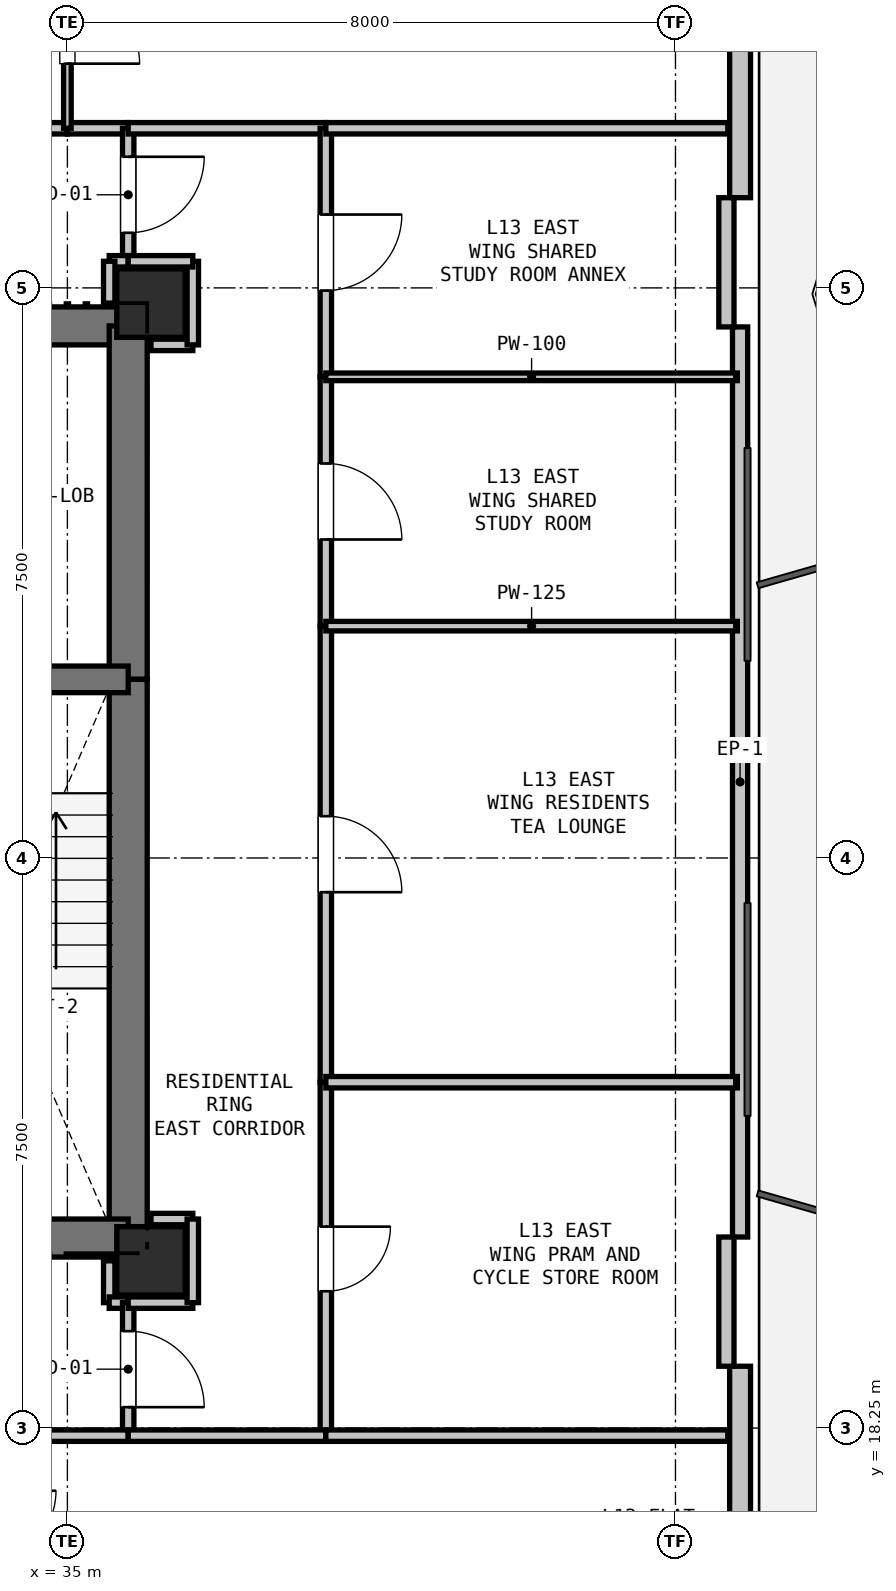
"""IFC4 building model, lengths in metres.
Left out: names, types, materials, properties, quantities, classifications, styles, units other than length and angle.
Written with IfcOpenShell. Run it as: python <this file> out.ifc"""

import sys

from ifc_helpers import new_model, si_unit, direction, frame, frame_2d, origin, origin_2d, place, context, subcontext, project, spatial, rectangle, extrude, element, fill, save


model = new_model("IFC4")
c1 = context("Model", 3, precision=1e-05, world=origin(), true_north=direction((0.0, 1.0)))
c2 = subcontext(c1, "Body", "Model", "MODEL_VIEW")
j1 = project(units=[si_unit("LENGTHUNIT", "METRE"), si_unit("PLANEANGLEUNIT", "RADIAN")], contexts=[c1])
p1 = place(None, origin())
s1 = spatial("IfcSite", under=j1, at=p1, CompositionType="ELEMENT")
p2 = place(p1, origin())
s2 = spatial("IfcBuilding", under=s1, at=p2, CompositionType="ELEMENT")
p3 = place(p2, frame((0.0, 0.0, 48.9)))
s3 = spatial("IfcBuildingStorey", under=s2, at=p3, CompositionType="ELEMENT", Elevation=48.9)
for number, where, z_axis, x_axis in (
    (1, (36.1, 33.05, 0.0), (0.0, 0.0, 1.0), (1.0, 0.0, 0.0)),
    (2, (36.1, 20.45, 0.0), (0.0, 0.0, 1.0), (1.0, 0.0, 0.0)),
):
    element("IfcColumn", number, at=place(p3, frame(where, z_axis=z_axis, x_axis=x_axis)), inside=s3, PredefinedType="COLUMN", context=c2, shape_type="SweptSolid", body=[
        extrude(rectangle(XDim=0.9, YDim=0.9, at=origin_2d()), origin(), (0.0, 0.0, 1.0), 3.3),
    ])
p4 = place(p3, frame((43.85, 47.11, 0.0), z_axis=(0.0, 0.0, 1.0), x_axis=(0.0, -1.0, 0.0)))
e3 = element("IfcWall", 3, at=p4, inside=s3, PredefinedType="SOLIDWALL", context=c2, shape_type="SweptSolid", body=[
    extrude(rectangle(XDim=12.673, YDim=0.275, at=frame_2d((6.336, 0.0))), origin(), (0.0, 0.0, 1.0), 2.66),
])
p5 = place(p4, frame((2.325, 0.0, 0.0)))
e4 = element("IfcOpeningElement", 4, at=p5, cuts=e3, PredefinedType="OPENING", context=c2, shape_type="SweptSolid", body=[
    extrude(rectangle(XDim=1.1, YDim=2.1, at=frame_2d((0.55, 1.05))), frame((0.0, 0.147, 0.0), z_axis=(0.0, -1.0, 0.0), x_axis=(1.0, 0.0, 0.0)), (0.0, 0.0, 1.0), 0.295),
])
p6 = place(p3, frame((43.85, 32.737, 0.0), z_axis=(0.0, 0.0, 1.0), x_axis=(0.0, -1.0, 0.0)))
e5 = element("IfcWall", 5, at=p6, inside=s3, PredefinedType="PARAPET", context=c2, shape_type="SweptSolid", body=[
    extrude(rectangle(XDim=11.973, YDim=0.2, at=frame_2d((5.987, 0.0))), origin(), (0.0, 0.0, 1.0), 0.2),
])
p7 = place(p3, frame((43.85, 19.063, 0.0), z_axis=(0.0, 0.0, 1.0), x_axis=(0.0, -1.0, 0.0)))
e6 = element("IfcWall", 6, at=p7, inside=s3, PredefinedType="SOLIDWALL", context=c2, shape_type="SweptSolid", body=[
    extrude(rectangle(XDim=12.673, YDim=0.275, at=frame_2d((6.336, 0.0))), origin(), (0.0, 0.0, 1.0), 2.66),
])
for number, where, z_axis, x_axis in (
    (7, (43.67, 34.437, 0.0), (0.0, 0.0, 1.0), (0.0, -1.0, 0.0)),
    (8, (43.67, 20.763, 0.0), (0.0, 0.0, 1.0), (0.0, -1.0, 0.0)),
):
    element("IfcWall", number, at=place(p3, frame(where, z_axis=z_axis, x_axis=x_axis)), inside=s3, PredefinedType="PARAPET", context=c2, shape_type="SweptSolid", body=[
        extrude(rectangle(XDim=1.7, YDim=0.2, at=frame_2d((0.85, 0.0))), origin(), (0.0, 0.0, 1.0), 2.66),
    ])
p8 = place(p3, frame((32.35, 32.75, 0.0), z_axis=(0.0, 0.0, 1.0), x_axis=(1.0, 0.0, 0.0)))
e9 = element("IfcWall", 9, at=p8, inside=s3, PredefinedType="SHEAR", context=c2, shape_type="SweptSolid", body=[
    extrude(rectangle(XDim=3.45, YDim=0.5, at=frame_2d((1.725, 0.0))), origin(), (0.0, 0.0, 1.0), 3.04),
])
p9 = place(p8, frame((0.65, 0.0, 0.0)))
e10 = element("IfcOpeningElement", 10, at=p9, cuts=e9, PredefinedType="OPENING", context=c2, shape_type="SweptSolid", body=[
    extrude(rectangle(XDim=1.15, YDim=2.15, at=frame_2d((0.575, 1.075))), frame((0.0, 0.26, 0.0), z_axis=(0.0, -1.0, 0.0), x_axis=(1.0, 0.0, 0.0)), (0.0, 0.0, 1.0), 0.52),
])
p10 = place(p3, frame((35.8, 32.75, 0.0), z_axis=(0.0, 0.0, 1.0), x_axis=(0.0, -1.0, 0.0)))
e11 = element("IfcWall", 11, at=p10, inside=s3, PredefinedType="SHEAR", context=c2, shape_type="SweptSolid", body=[
    extrude(rectangle(XDim=4.65, YDim=0.5, at=frame_2d((2.325, 0.0))), origin(), (0.0, 0.0, 1.0), 3.04),
])
p11 = place(p3, frame((35.8, 28.1, 0.0), z_axis=(0.0, 0.0, 1.0), x_axis=(0.0, -1.0, 0.0)))
e12 = element("IfcWall", 12, at=p11, inside=s3, PredefinedType="SHEAR", context=c2, shape_type="SweptSolid", body=[
    extrude(rectangle(XDim=7.35, YDim=0.5, at=frame_2d((3.675, 0.0))), origin(), (0.0, 0.0, 1.0), 3.04),
])
p12 = place(p3, frame((35.8, 20.75, 0.0), z_axis=(0.0, 0.0, 1.0), x_axis=(-1.0, 0.0, 0.0)))
e13 = element("IfcWall", 13, at=p12, inside=s3, PredefinedType="SHEAR", context=c2, shape_type="SweptSolid", body=[
    extrude(rectangle(XDim=3.45, YDim=0.5, at=frame_2d((1.725, 0.0))), origin(), (0.0, 0.0, 1.0), 3.04),
])
p13 = place(p3, frame((32.35, 28.1, 0.0), z_axis=(0.0, 0.0, 1.0), x_axis=(1.0, 0.0, 0.0)))
e14 = element("IfcWall", 14, at=p13, inside=s3, PredefinedType="SHEAR", context=c2, shape_type="SweptSolid", body=[
    extrude(rectangle(XDim=3.45, YDim=0.35, at=frame_2d((1.725, 0.0))), origin(), (0.0, 0.0, 1.0), 3.04),
])
p14 = place(p13, frame((1.15, 0.0, 0.0)))
e15 = element("IfcOpeningElement", 15, at=p14, cuts=e14, PredefinedType="OPENING", context=c2, shape_type="SweptSolid", body=[
    extrude(rectangle(XDim=1.15, YDim=2.15, at=frame_2d((0.575, 1.075))), frame((0.0, 0.185, 0.0), z_axis=(0.0, -1.0, 0.0), x_axis=(1.0, 0.0, 0.0)), (0.0, 0.0, 1.0), 0.37),
])
p15 = place(p3, frame((35.55, 20.45, 0.0), z_axis=(0.0, 0.0, 1.0), x_axis=(0.0, -1.0, 0.0)))
e16 = element("IfcWall", 16, at=p15, inside=s3, PredefinedType="PARTITIONING", context=c2, shape_type="SweptSolid", body=[
    extrude(rectangle(XDim=0.55, YDim=0.15, at=frame_2d((0.275, 0.0))), origin(), (0.0, 0.0, 1.0), 2.488),
])
p16 = place(p3, frame((35.55, 19.9, 0.0), z_axis=(0.0, 0.0, 1.0), x_axis=(1.0, 0.0, 0.0)))
e17 = element("IfcWall", 17, at=p16, inside=s3, PredefinedType="PARTITIONING", context=c2, shape_type="SweptSolid", body=[
    extrude(rectangle(XDim=0.25, YDim=0.15, at=frame_2d((0.125, 0.0))), origin(), (0.0, 0.0, 1.0), 3.04),
])
p17 = place(p3, frame((35.8, 19.9, 0.0), z_axis=(0.0, 0.0, 1.0), x_axis=(0.0, -1.0, 0.0)))
e18 = element("IfcWall", 18, at=p17, inside=s3, PredefinedType="PARTITIONING", context=c2, shape_type="SweptSolid", body=[
    extrude(rectangle(XDim=1.75, YDim=0.15, at=frame_2d((0.875, 0.0))), origin(), (0.0, 0.0, 1.0), 3.04),
])
p18 = place(p17, frame((0.375, 0.0, 0.0)))
e19 = element("IfcOpeningElement", 19, at=p18, cuts=e18, PredefinedType="OPENING", context=c2, shape_type="SweptSolid", body=[
    extrude(rectangle(XDim=1.0, YDim=2.15, at=frame_2d((0.5, 1.075))), frame((0.0, 0.085, 0.0), z_axis=(0.0, -1.0, 0.0), x_axis=(1.0, 0.0, 0.0)), (0.0, 0.0, 1.0), 0.17),
])
p19 = place(p3, frame((35.8, 18.15, 0.0), z_axis=(0.0, 0.0, 1.0), x_axis=(-1.0, 0.0, 0.0)))
e20 = element("IfcWall", 20, at=p19, inside=s3, PredefinedType="PARTITIONING", context=c2, shape_type="SweptSolid", body=[
    extrude(rectangle(XDim=1.9, YDim=0.15, at=frame_2d((0.95, 0.0))), origin(), (0.0, 0.0, 1.0), 3.04),
])
p20 = place(p3, frame((32.5, 35.35, 0.0), z_axis=(0.0, 0.0, 1.0), x_axis=(1.0, 0.0, 0.0)))
e21 = element("IfcWall", 21, at=p20, inside=s3, PredefinedType="PARTITIONING", context=c2, shape_type="SweptSolid", body=[
    extrude(rectangle(XDim=2.5, YDim=0.15, at=frame_2d((1.25, 0.0))), origin(), (0.0, 0.0, 1.0), 3.04),
])
p21 = place(p20, frame((0.75, 0.0, 0.0)))
e22 = element("IfcOpeningElement", 22, at=p21, cuts=e21, PredefinedType="OPENING", context=c2, shape_type="SweptSolid", body=[
    extrude(rectangle(XDim=1.0, YDim=2.15, at=frame_2d((0.5, 1.075))), frame((0.0, 0.085, 0.0), z_axis=(0.0, -1.0, 0.0), x_axis=(1.0, 0.0, 0.0)), (0.0, 0.0, 1.0), 0.17),
])
p22 = place(p3, frame((35.0, 35.35, 0.0), z_axis=(0.0, 0.0, 1.0), x_axis=(1.0, 0.0, 0.0)))
e23 = element("IfcWall", 23, at=p22, inside=s3, PredefinedType="PARTITIONING", context=c2, shape_type="SweptSolid", body=[
    extrude(rectangle(XDim=0.8, YDim=0.15, at=frame_2d((0.4, 0.0))), origin(), (0.0, 0.0, 1.0), 3.04),
])
p23 = place(p3, frame((35.8, 35.35, 0.0), z_axis=(0.0, 0.0, 1.0), x_axis=(0.0, -1.0, 0.0)))
e24 = element("IfcWall", 24, at=p23, inside=s3, PredefinedType="PARTITIONING", context=c2, shape_type="SweptSolid", body=[
    extrude(rectangle(XDim=1.75, YDim=0.15, at=frame_2d((0.875, 0.0))), origin(), (0.0, 0.0, 1.0), 3.04),
])
p24 = place(p23, frame((0.375, 0.0, 0.0)))
e25 = element("IfcOpeningElement", 25, at=p24, cuts=e24, PredefinedType="OPENING", context=c2, shape_type="SweptSolid", body=[
    extrude(rectangle(XDim=1.0, YDim=2.15, at=frame_2d((0.5, 1.075))), frame((0.0, 0.085, 0.0), z_axis=(0.0, -1.0, 0.0), x_axis=(1.0, 0.0, 0.0)), (0.0, 0.0, 1.0), 0.17),
])
p25 = place(p3, frame((35.8, 33.6, 0.0), z_axis=(0.0, 0.0, 1.0), x_axis=(-1.0, 0.0, 0.0)))
e26 = element("IfcWall", 26, at=p25, inside=s3, PredefinedType="PARTITIONING", context=c2, shape_type="SweptSolid", body=[
    extrude(rectangle(XDim=0.25, YDim=0.15, at=frame_2d((0.125, 0.0))), origin(), (0.0, 0.0, 1.0), 3.04),
])
p26 = place(p3, frame((35.55, 33.6, 0.0), z_axis=(0.0, 0.0, 1.0), x_axis=(0.0, -1.0, 0.0)))
e27 = element("IfcWall", 27, at=p26, inside=s3, PredefinedType="PARTITIONING", context=c2, shape_type="SweptSolid", body=[
    extrude(rectangle(XDim=0.55, YDim=0.15, at=frame_2d((0.275, 0.0))), origin(), (0.0, 0.0, 1.0), 2.488),
])
for number, where, z_axis, x_axis in (
    (28, (36.65, 21.0, 0.0), (0.0, 0.0, 1.0), (-1.0, 0.0, 0.0)),
    (29, (36.1, 32.5, 0.0), (0.0, 0.0, 1.0), (1.0, 0.0, 0.0)),
):
    element("IfcWall", number, at=place(p3, frame(where, z_axis=z_axis, x_axis=x_axis)), inside=s3, PredefinedType="PARTITIONING", context=c2, shape_type="SweptSolid", body=[
        extrude(rectangle(XDim=0.55, YDim=0.15, at=frame_2d((0.275, 0.0))), origin(), (0.0, 0.0, 1.0), 2.488),
    ])
p27 = place(p3, frame((36.65, 32.5, 0.0), z_axis=(0.0, 0.0, 1.0), x_axis=(0.0, 1.0, 0.0)))
e30 = element("IfcWall", 30, at=p27, inside=s3, PredefinedType="PARTITIONING", context=c2, shape_type="SweptSolid", body=[
    extrude(rectangle(XDim=1.1, YDim=0.15, at=frame_2d((0.55, 0.0))), origin(), (0.0, 0.0, 1.0), 2.338),
])
p28 = place(p3, frame((36.65, 33.6, 0.0), z_axis=(0.0, 0.0, 1.0), x_axis=(-1.0, 0.0, 0.0)))
e31 = element("IfcWall", 31, at=p28, inside=s3, PredefinedType="PARTITIONING", context=c2, shape_type="SweptSolid", body=[
    extrude(rectangle(XDim=0.85, YDim=0.15, at=frame_2d((0.425, 0.0))), origin(), (0.0, 0.0, 1.0), 2.338),
])
p29 = place(p3, frame((35.8, 35.35, 0.0), z_axis=(0.0, 0.0, 1.0), x_axis=(1.0, 0.0, 0.0)))
e32 = element("IfcWall", 32, at=p29, inside=s3, PredefinedType="PARTITIONING", context=c2, shape_type="SweptSolid", body=[
    extrude(rectangle(XDim=2.6, YDim=0.15, at=frame_2d((1.3, 0.0))), origin(), (0.0, 0.0, 1.0), 2.338),
])
p30 = place(p3, frame((38.4, 35.35, 0.0), z_axis=(0.0, 0.0, 1.0), x_axis=(0.0, -1.0, 0.0)))
e33 = element("IfcWall", 33, at=p30, inside=s3, PredefinedType="PARTITIONING", context=c2, shape_type="SweptSolid", body=[
    extrude(rectangle(XDim=3.27, YDim=0.15, at=frame_2d((1.635, 0.0))), origin(), (0.0, 0.0, 1.0), 2.338),
])
p31 = place(p30, frame((1.135, 0.0, 0.0)))
e34 = element("IfcOpeningElement", 34, at=p31, cuts=e33, PredefinedType="OPENING", context=c2, shape_type="SweptSolid", body=[
    extrude(rectangle(XDim=1.0, YDim=2.15, at=frame_2d((0.5, 1.075))), frame((0.0, 0.085, 0.0), z_axis=(0.0, -1.0, 0.0), x_axis=(1.0, 0.0, 0.0)), (0.0, 0.0, 1.0), 0.17),
])
p32 = place(p3, frame((38.4, 32.08, 0.0), z_axis=(0.0, 0.0, 1.0), x_axis=(0.0, -1.0, 0.0)))
e35 = element("IfcWall", 35, at=p32, inside=s3, PredefinedType="PARTITIONING", context=c2, shape_type="SweptSolid", body=[
    extrude(rectangle(XDim=3.28, YDim=0.15, at=frame_2d((1.64, 0.0))), origin(), (0.0, 0.0, 1.0), 3.04),
])
p33 = place(p32, frame((1.14, 0.0, 0.0)))
e36 = element("IfcOpeningElement", 36, at=p33, cuts=e35, PredefinedType="OPENING", context=c2, shape_type="SweptSolid", body=[
    extrude(rectangle(XDim=1.0, YDim=2.15, at=frame_2d((0.5, 1.075))), frame((0.0, 0.085, 0.0), z_axis=(0.0, -1.0, 0.0), x_axis=(1.0, 0.0, 0.0)), (0.0, 0.0, 1.0), 0.17),
])
p34 = place(p3, frame((38.4, 28.8, 0.0), z_axis=(0.0, 0.0, 1.0), x_axis=(0.0, -1.0, 0.0)))
e37 = element("IfcWall", 37, at=p34, inside=s3, PredefinedType="PARTITIONING", context=c2, shape_type="SweptSolid", body=[
    extrude(rectangle(XDim=6.0, YDim=0.15, at=frame_2d((3.0, 0.0))), origin(), (0.0, 0.0, 1.0), 3.04),
])
p35 = place(p34, frame((2.5, 0.0, 0.0)))
e38 = element("IfcOpeningElement", 38, at=p35, cuts=e37, PredefinedType="OPENING", context=c2, shape_type="SweptSolid", body=[
    extrude(rectangle(XDim=1.0, YDim=2.15, at=frame_2d((0.5, 1.075))), frame((0.0, 0.085, 0.0), z_axis=(0.0, -1.0, 0.0), x_axis=(1.0, 0.0, 0.0)), (0.0, 0.0, 1.0), 0.17),
])
p36 = place(p3, frame((38.4, 22.8, 0.0), z_axis=(0.0, 0.0, 1.0), x_axis=(0.0, -1.0, 0.0)))
e39 = element("IfcWall", 39, at=p36, inside=s3, PredefinedType="PARTITIONING", context=c2, shape_type="SweptSolid", body=[
    extrude(rectangle(XDim=4.65, YDim=0.15, at=frame_2d((2.325, 0.0))), origin(), (0.0, 0.0, 1.0), 3.04),
])
p37 = place(p36, frame((1.9, 0.0, 0.0)))
e40 = element("IfcOpeningElement", 40, at=p37, cuts=e39, PredefinedType="OPENING", context=c2, shape_type="SweptSolid", body=[
    extrude(rectangle(XDim=0.85, YDim=2.1, at=frame_2d((0.425, 1.05))), frame((0.0, 0.085, 0.0), z_axis=(0.0, -1.0, 0.0), x_axis=(1.0, 0.0, 0.0)), (0.0, 0.0, 1.0), 0.17),
])
p38 = place(p3, frame((38.4, 18.15, 0.0), z_axis=(0.0, 0.0, 1.0), x_axis=(-1.0, 0.0, 0.0)))
e41 = element("IfcWall", 41, at=p38, inside=s3, PredefinedType="PARTITIONING", context=c2, shape_type="SweptSolid", body=[
    extrude(rectangle(XDim=2.6, YDim=0.15, at=frame_2d((1.3, 0.0))), origin(), (0.0, 0.0, 1.0), 2.338),
])
p39 = place(p3, frame((35.8, 19.9, 0.0), z_axis=(0.0, 0.0, 1.0), x_axis=(1.0, 0.0, 0.0)))
e42 = element("IfcWall", 42, at=p39, inside=s3, PredefinedType="PARTITIONING", context=c2, shape_type="SweptSolid", body=[
    extrude(rectangle(XDim=0.85, YDim=0.15, at=frame_2d((0.425, 0.0))), origin(), (0.0, 0.0, 1.0), 2.338),
])
p40 = place(p3, frame((36.65, 19.9, 0.0), z_axis=(0.0, 0.0, 1.0), x_axis=(0.0, 1.0, 0.0)))
e43 = element("IfcWall", 43, at=p40, inside=s3, PredefinedType="PARTITIONING", context=c2, shape_type="SweptSolid", body=[
    extrude(rectangle(XDim=1.1, YDim=0.15, at=frame_2d((0.55, 0.0))), origin(), (0.0, 0.0, 1.0), 3.04),
])
p41 = place(p3, frame((35.0, 38.0, 0.0), z_axis=(0.0, 0.0, 1.0), x_axis=(0.0, -1.0, 0.0)))
e44 = element("IfcWall", 44, at=p41, inside=s3, PredefinedType="PARTITIONING", context=c2, shape_type="SweptSolid", body=[
    extrude(rectangle(XDim=2.65, YDim=0.1, at=frame_2d((1.325, 0.0))), origin(), (0.0, 0.0, 1.0), 3.04),
])
p42 = place(p41, frame((0.85, 0.0, 0.0)))
e45 = element("IfcOpeningElement", 45, at=p42, cuts=e44, PredefinedType="OPENING", context=c2, shape_type="SweptSolid", body=[
    extrude(rectangle(XDim=0.95, YDim=2.1, at=frame_2d((0.475, 1.05))), frame((0.0, 0.06, 0.0), z_axis=(0.0, -1.0, 0.0), x_axis=(1.0, 0.0, 0.0)), (0.0, 0.0, 1.0), 0.12),
])
p43 = place(p3, frame((43.688, 35.35, 0.0), z_axis=(0.0, 0.0, 1.0), x_axis=(-1.0, 0.0, 0.0)))
e46 = element("IfcWall", 46, at=p43, inside=s3, PredefinedType="PARTITIONING", context=c2, shape_type="SweptSolid", body=[
    extrude(rectangle(XDim=5.289, YDim=0.15, at=frame_2d((2.644, 0.0))), origin(), (0.0, 0.0, 1.0), 2.338),
])
p44 = place(p3, frame((38.4, 18.15, 0.0), z_axis=(0.0, 0.0, 1.0), x_axis=(1.0, 0.0, 0.0)))
e47 = element("IfcWall", 47, at=p44, inside=s3, PredefinedType="PARTITIONING", context=c2, shape_type="SweptSolid", body=[
    extrude(rectangle(XDim=5.289, YDim=0.15, at=frame_2d((2.644, 0.0))), origin(), (0.0, 0.0, 1.0), 2.365),
])
p45 = place(p3, frame((38.4, 32.08, 0.0), z_axis=(0.0, 0.0, 1.0), x_axis=(1.0, 0.0, 0.0)))
e48 = element("IfcWall", 48, at=p45, inside=s3, PredefinedType="PARTITIONING", context=c2, shape_type="SweptSolid", body=[
    extrude(rectangle(XDim=5.414, YDim=0.1, at=frame_2d((2.707, 0.0))), origin(), (0.0, 0.0, 1.0), 2.365),
])
p46 = place(p3, frame((43.814, 28.8, 0.0), z_axis=(0.0, 0.0, 1.0), x_axis=(-1.0, 0.0, 0.0)))
e49 = element("IfcWall", 49, at=p46, inside=s3, PredefinedType="PARTITIONING", context=c2, shape_type="SweptSolid", body=[
    extrude(rectangle(XDim=5.414, YDim=0.125, at=frame_2d((2.707, 0.0))), origin(), (0.0, 0.0, 1.0), 2.365),
])
p47 = place(p3, frame((43.814, 22.8, 0.0), z_axis=(0.0, 0.0, 1.0), x_axis=(-1.0, 0.0, 0.0)))
e50 = element("IfcWall", 50, at=p47, inside=s3, PredefinedType="PARTITIONING", context=c2, shape_type="SweptSolid", body=[
    extrude(rectangle(XDim=5.414, YDim=0.15, at=frame_2d((2.707, 0.0))), origin(), (0.0, 0.0, 1.0), 2.365),
])
p48 = place(p18, origin())
e51 = element("IfcDoor", 51, at=p48, inside=s3, OperationType="SINGLE_SWING_RIGHT", PredefinedType="DOOR", context=c2, shape_type="SweptSolid", body=[
    extrude(rectangle(XDim=1.0, YDim=2.15, at=frame_2d((0.5, 1.075))), frame((0.0, 0.025, 0.0), z_axis=(0.0, -1.0, 0.0), x_axis=(1.0, 0.0, 0.0)), (0.0, 0.0, 1.0), 0.05),
])
fill(e19, e51)
p49 = place(p24, origin())
e52 = element("IfcDoor", 52, at=p49, inside=s3, OperationType="SINGLE_SWING_LEFT", PredefinedType="DOOR", context=c2, shape_type="SweptSolid", body=[
    extrude(rectangle(XDim=1.0, YDim=2.15, at=frame_2d((0.5, 1.075))), frame((0.0, 0.025, 0.0), z_axis=(0.0, -1.0, 0.0), x_axis=(1.0, 0.0, 0.0)), (0.0, 0.0, 1.0), 0.05),
])
fill(e25, e52)
p50 = place(p33, origin())
e53 = element("IfcDoor", 53, at=p50, inside=s3, OperationType="SINGLE_SWING_RIGHT", PredefinedType="DOOR", context=c2, shape_type="SweptSolid", body=[
    extrude(rectangle(XDim=1.0, YDim=2.15, at=frame_2d((0.5, 1.075))), frame((0.0, 0.025, 0.0), z_axis=(0.0, -1.0, 0.0), x_axis=(1.0, 0.0, 0.0)), (0.0, 0.0, 1.0), 0.05),
])
fill(e36, e53)
p51 = place(p31, origin())
e54 = element("IfcDoor", 54, at=p51, inside=s3, OperationType="SINGLE_SWING_LEFT", PredefinedType="DOOR", context=c2, shape_type="SweptSolid", body=[
    extrude(rectangle(XDim=1.0, YDim=2.15, at=frame_2d((0.5, 1.075))), frame((0.0, 0.025, 0.0), z_axis=(0.0, -1.0, 0.0), x_axis=(1.0, 0.0, 0.0)), (0.0, 0.0, 1.0), 0.05),
])
fill(e34, e54)
p52 = place(p35, origin())
e55 = element("IfcDoor", 55, at=p52, inside=s3, OperationType="SINGLE_SWING_RIGHT", PredefinedType="DOOR", context=c2, shape_type="SweptSolid", body=[
    extrude(rectangle(XDim=1.0, YDim=2.15, at=frame_2d((0.5, 1.075))), frame((0.0, 0.025, 0.0), z_axis=(0.0, -1.0, 0.0), x_axis=(1.0, 0.0, 0.0)), (0.0, 0.0, 1.0), 0.05),
])
fill(e38, e55)
p53 = place(p37, origin())
e56 = element("IfcDoor", 56, at=p53, inside=s3, OperationType="SINGLE_SWING_LEFT", PredefinedType="DOOR", context=c2, shape_type="SweptSolid", body=[
    extrude(rectangle(XDim=0.85, YDim=2.1, at=frame_2d((0.425, 1.05))), frame((0.0, 0.025, 0.0), z_axis=(0.0, -1.0, 0.0), x_axis=(1.0, 0.0, 0.0)), (0.0, 0.0, 1.0), 0.05),
])
fill(e40, e56)
p54 = place(p42, origin())
e57 = element("IfcDoor", 57, at=p54, inside=s3, OperationType="SINGLE_SWING_RIGHT", PredefinedType="DOOR", context=c2, shape_type="SweptSolid", body=[
    extrude(rectangle(XDim=0.95, YDim=2.1, at=frame_2d((0.475, 1.05))), frame((0.0, 0.025, 0.0), z_axis=(0.0, -1.0, 0.0), x_axis=(1.0, 0.0, 0.0)), (0.0, 0.0, 1.0), 0.05),
])
fill(e45, e57)
save(model, sys.argv[1])
